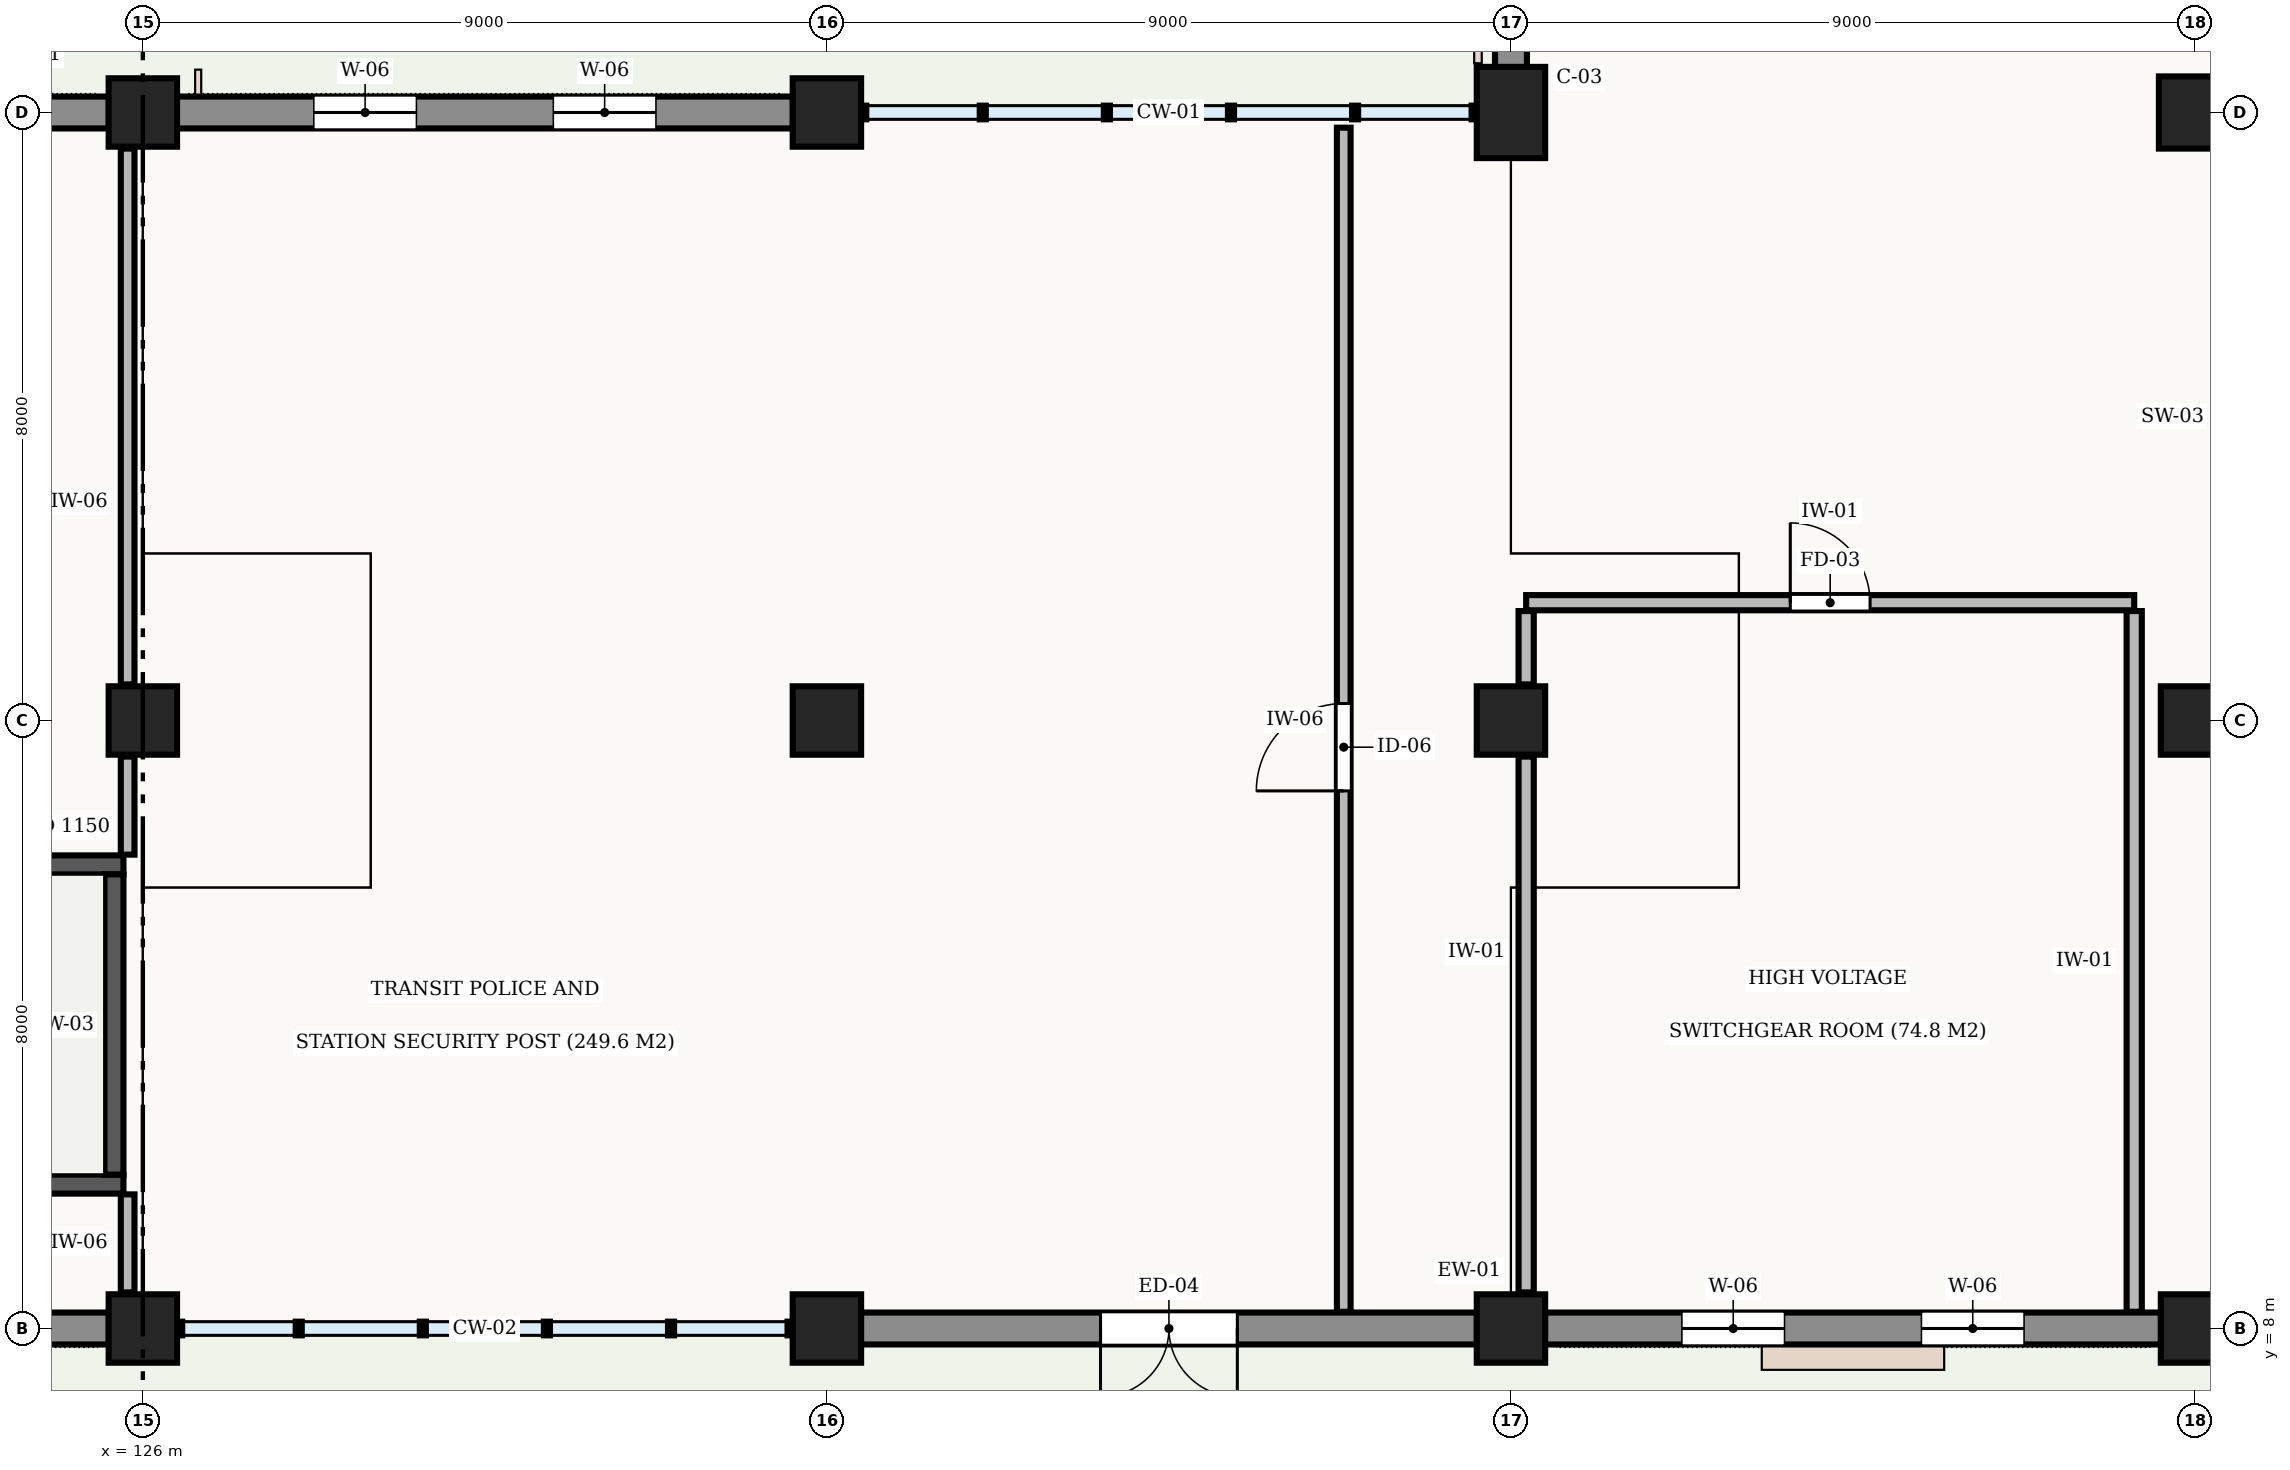
"""IFC4 building model, lengths in metres.
Left out: names, types, materials, properties, quantities, classifications, styles, units other than length and angle.
Written with IfcOpenShell. Run it as: python <this file> out.ifc"""

import sys

from ifc_helpers import new_model, si_unit, direction, frame, frame_2d, origin, origin_2d, place, context, subcontext, project, spatial, rectangle, extrude, element, fill, save


model = new_model("IFC4")
c1 = context("Model", 3, precision=1e-05, world=origin(), true_north=direction((0.0, 1.0)))
c2 = subcontext(c1, "Body", "Model", "MODEL_VIEW")
j1 = project(units=[si_unit("LENGTHUNIT", "METRE"), si_unit("PLANEANGLEUNIT", "RADIAN")], contexts=[c1])
p1 = place(None, origin())
s1 = spatial("IfcSite", under=j1, at=p1, CompositionType="ELEMENT")
p2 = place(p1, origin())
s2 = spatial("IfcBuilding", under=s1, at=p2, CompositionType="ELEMENT")
p3 = place(p2, origin())
s3 = spatial("IfcBuildingStorey", under=s2, at=p3, CompositionType="ELEMENT", Elevation=0.0)
for number, where, z_axis, x_axis in (
    (1, (126.0, 8.0, -0.42), (0.0, 0.0, 1.0), (1.0, 0.0, 0.0)),
    (2, (126.0, 16.0, -0.42), (0.0, 0.0, 1.0), (1.0, 0.0, 0.0)),
    (3, (126.0, 24.0, -0.42), (0.0, 0.0, 1.0), (1.0, 0.0, 0.0)),
    (4, (135.0, 8.0, -0.42), (0.0, 0.0, 1.0), (1.0, 0.0, 0.0)),
    (5, (135.0, 16.0, -0.42), (0.0, 0.0, 1.0), (1.0, 0.0, 0.0)),
    (6, (135.0, 24.0, -0.42), (0.0, 0.0, 1.0), (1.0, 0.0, 0.0)),
    (7, (144.0, 8.0, -0.42), (0.0, 0.0, 1.0), (1.0, 0.0, 0.0)),
    (8, (144.0, 16.0, -0.42), (0.0, 0.0, 1.0), (1.0, 0.0, 0.0)),
):
    element("IfcColumn", number, at=place(p3, frame(where, z_axis=z_axis, x_axis=x_axis)), inside=s3, PredefinedType="COLUMN", context=c2, shape_type="SweptSolid", body=[
        extrude(rectangle(XDim=0.9, YDim=0.9, at=origin_2d()), origin(), (0.0, 0.0, 1.0), 5.82),
    ])
p4 = place(p3, frame((144.0, 24.0, -0.42), z_axis=(0.0, 0.0, 1.0), x_axis=(1.0, 0.0, 0.0)))
e9 = element("IfcColumn", 9, at=p4, inside=s3, PredefinedType="COLUMN", context=c2, shape_type="SweptSolid", body=[
    extrude(rectangle(XDim=0.9, YDim=1.2, at=origin_2d()), origin(), (0.0, 0.0, 1.0), 5.82),
])
for number, where, z_axis, x_axis in (
    (10, (153.0, 8.0, -0.42), (0.0, 0.0, 1.0), (1.0, 0.0, 0.0)),
    (11, (153.0, 16.0, -0.42), (0.0, 0.0, 1.0), (1.0, 0.0, 0.0)),
):
    element("IfcColumn", number, at=place(p3, frame(where, z_axis=z_axis, x_axis=x_axis)), inside=s3, PredefinedType="COLUMN", context=c2, shape_type="SweptSolid", body=[
        extrude(rectangle(XDim=0.9, YDim=0.9, at=origin_2d()), origin(), (0.0, 0.0, 1.0), 5.82),
    ])
p5 = place(p3, frame((153.0, 24.0, -0.42), z_axis=(0.0, 0.0, 1.0), x_axis=(1.0, 0.0, 0.0)))
e12 = element("IfcColumn", 12, at=p5, inside=s3, PredefinedType="COLUMN", context=c2, shape_type="SweptSolid", body=[
    extrude(rectangle(XDim=0.95, YDim=0.95, at=origin_2d()), origin(), (0.0, 0.0, 1.0), 5.82),
])
p6 = place(p3, frame((152.552, 8.0, 0.0), z_axis=(0.0, 0.0, 1.0), x_axis=(-1.0, 0.0, 0.0)))
e13 = element("IfcWall", 13, at=p6, inside=s3, PredefinedType="STANDARD", context=c2, shape_type="SweptSolid", body=[
    extrude(rectangle(XDim=8.104, YDim=0.42, at=frame_2d((4.052, 0.0))), origin(), (0.0, 0.0, 1.0), 4.38),
])
p7 = place(p6, frame((1.801, 0.0, 0.9)))
e14 = element("IfcOpeningElement", 14, at=p7, cuts=e13, PredefinedType="OPENING", context=c2, shape_type="SweptSolid", body=[
    extrude(rectangle(XDim=1.35, YDim=2.0, at=frame_2d((0.675, 1.0))), frame((0.0, 0.222, 0.0), z_axis=(0.0, -1.0, 0.0), x_axis=(1.0, 0.0, 0.0)), (0.0, 0.0, 1.0), 0.444),
])
p8 = place(p6, frame((4.953, 0.0, 0.9)))
e15 = element("IfcOpeningElement", 15, at=p8, cuts=e13, PredefinedType="OPENING", context=c2, shape_type="SweptSolid", body=[
    extrude(rectangle(XDim=1.35, YDim=2.0, at=frame_2d((0.675, 1.0))), frame((0.0, 0.222, 0.0), z_axis=(0.0, -1.0, 0.0), x_axis=(1.0, 0.0, 0.0)), (0.0, 0.0, 1.0), 0.444),
])
p9 = place(p3, frame((143.552, 8.0, 0.0), z_axis=(0.0, 0.0, 1.0), x_axis=(-1.0, 0.0, 0.0)))
e16 = element("IfcWall", 16, at=p9, inside=s3, PredefinedType="STANDARD", context=c2, shape_type="SweptSolid", body=[
    extrude(rectangle(XDim=8.104, YDim=0.42, at=frame_2d((4.052, 0.0))), origin(), (0.0, 0.0, 1.0), 4.38),
])
p10 = place(p9, frame((3.152, 0.0, 0.0)))
e17 = element("IfcOpeningElement", 17, at=p10, cuts=e16, PredefinedType="OPENING", context=c2, shape_type="SweptSolid", body=[
    extrude(rectangle(XDim=1.8, YDim=2.4, at=frame_2d((0.9, 1.2))), frame((0.0, 0.222, 0.0), z_axis=(0.0, -1.0, 0.0), x_axis=(1.0, 0.0, 0.0)), (0.0, 0.0, 1.0), 0.444),
])
p11 = place(p3, frame((125.552, 8.0, 0.0), z_axis=(0.0, 0.0, 1.0), x_axis=(-1.0, 0.0, 0.0)))
e18 = element("IfcWall", 18, at=p11, inside=s3, PredefinedType="STANDARD", context=c2, shape_type="SweptSolid", body=[
    extrude(rectangle(XDim=8.104, YDim=0.42, at=frame_2d((4.052, 0.0))), origin(), (0.0, 0.0, 1.0), 4.38),
])
p12 = place(p11, frame((1.501, 0.0, 0.9)))
e19 = element("IfcOpeningElement", 19, at=p12, cuts=e18, PredefinedType="OPENING", context=c2, shape_type="SweptSolid", body=[
    extrude(rectangle(XDim=1.8, YDim=2.4, at=frame_2d((0.9, 1.2))), frame((0.0, 0.222, 0.0), z_axis=(0.0, -1.0, 0.0), x_axis=(1.0, 0.0, 0.0)), (0.0, 0.0, 1.0), 0.444),
])
p13 = place(p11, frame((4.803, 0.0, 0.9)))
e20 = element("IfcOpeningElement", 20, at=p13, cuts=e18, PredefinedType="OPENING", context=c2, shape_type="SweptSolid", body=[
    extrude(rectangle(XDim=1.8, YDim=2.4, at=frame_2d((0.9, 1.2))), frame((0.0, 0.222, 0.0), z_axis=(0.0, -1.0, 0.0), x_axis=(1.0, 0.0, 0.0)), (0.0, 0.0, 1.0), 0.444),
])
p14 = place(p3, frame((126.448, 24.0, 0.0), z_axis=(0.0, 0.0, 1.0), x_axis=(1.0, 0.0, 0.0)))
e21 = element("IfcWall", 21, at=p14, inside=s3, PredefinedType="STANDARD", context=c2, shape_type="SweptSolid", body=[
    extrude(rectangle(XDim=8.104, YDim=0.42, at=frame_2d((4.052, 0.0))), origin(), (0.0, 0.0, 1.0), 4.38),
])
p15 = place(p14, frame((1.801, 0.0, 0.9)))
e22 = element("IfcOpeningElement", 22, at=p15, cuts=e21, PredefinedType="OPENING", context=c2, shape_type="SweptSolid", body=[
    extrude(rectangle(XDim=1.35, YDim=2.0, at=frame_2d((0.675, 1.0))), frame((0.0, 0.222, 0.0), z_axis=(0.0, -1.0, 0.0), x_axis=(1.0, 0.0, 0.0)), (0.0, 0.0, 1.0), 0.444),
])
p16 = place(p14, frame((4.953, 0.0, 0.9)))
e23 = element("IfcOpeningElement", 23, at=p16, cuts=e21, PredefinedType="OPENING", context=c2, shape_type="SweptSolid", body=[
    extrude(rectangle(XDim=1.35, YDim=2.0, at=frame_2d((0.675, 1.0))), frame((0.0, 0.222, 0.0), z_axis=(0.0, -1.0, 0.0), x_axis=(1.0, 0.0, 0.0)), (0.0, 0.0, 1.0), 0.444),
])
p17 = place(p3, frame((144.0, 24.598, 0.0), z_axis=(0.0, 0.0, 1.0), x_axis=(0.0, 1.0, 0.0)))
e24 = element("IfcWall", 24, at=p17, inside=s3, PredefinedType="STANDARD", context=c2, shape_type="SweptSolid", body=[
    extrude(rectangle(XDim=6.804, YDim=0.42, at=frame_2d((3.402, 0.0))), origin(), (0.0, 0.0, 1.0), 4.38),
])
p18 = place(p17, frame((1.368, 0.0, 0.9)))
e25 = element("IfcOpeningElement", 25, at=p18, cuts=e24, PredefinedType="OPENING", context=c2, shape_type="SweptSolid", body=[
    extrude(rectangle(XDim=1.35, YDim=2.0, at=frame_2d((0.675, 1.0))), frame((0.0, 0.222, 0.0), z_axis=(0.0, -1.0, 0.0), x_axis=(1.0, 0.0, 0.0)), (0.0, 0.0, 1.0), 0.444),
])
p19 = place(p17, frame((4.086, 0.0, 0.9)))
e26 = element("IfcOpeningElement", 26, at=p19, cuts=e24, PredefinedType="OPENING", context=c2, shape_type="SweptSolid", body=[
    extrude(rectangle(XDim=1.35, YDim=2.0, at=frame_2d((0.675, 1.0))), frame((0.0, 0.222, 0.0), z_axis=(0.0, -1.0, 0.0), x_axis=(1.0, 0.0, 0.0)), (0.0, 0.0, 1.0), 0.444),
])
p20 = place(p3, frame((117.448, 24.0, 0.0), z_axis=(0.0, 0.0, 1.0), x_axis=(1.0, 0.0, 0.0)))
e27 = element("IfcWall", 27, at=p20, inside=s3, PredefinedType="STANDARD", context=c2, shape_type="SweptSolid", body=[
    extrude(rectangle(XDim=8.104, YDim=0.42, at=frame_2d((4.052, 0.0))), origin(), (0.0, 0.0, 1.0), 4.38),
])
p21 = place(p20, frame((1.501, 0.0, 0.9)))
e28 = element("IfcOpeningElement", 28, at=p21, cuts=e27, PredefinedType="OPENING", context=c2, shape_type="SweptSolid", body=[
    extrude(rectangle(XDim=1.8, YDim=2.4, at=frame_2d((0.9, 1.2))), frame((0.0, 0.222, 0.0), z_axis=(0.0, -1.0, 0.0), x_axis=(1.0, 0.0, 0.0)), (0.0, 0.0, 1.0), 0.444),
])
p22 = place(p20, frame((4.803, 0.0, 0.9)))
e29 = element("IfcOpeningElement", 29, at=p22, cuts=e27, PredefinedType="OPENING", context=c2, shape_type="SweptSolid", body=[
    extrude(rectangle(XDim=1.8, YDim=2.4, at=frame_2d((0.9, 1.2))), frame((0.0, 0.222, 0.0), z_axis=(0.0, -1.0, 0.0), x_axis=(1.0, 0.0, 0.0)), (0.0, 0.0, 1.0), 0.444),
])
p23 = place(p3, frame((117.255, 9.9, 0.0), z_axis=(0.0, 0.0, 1.0), x_axis=(1.0, 0.0, 0.0)))
e30 = element("IfcWall", 30, at=p23, inside=s3, PredefinedType="SHEAR", context=c2, shape_type="SweptSolid", body=[
    extrude(rectangle(XDim=8.49, YDim=0.25, at=frame_2d((4.245, 0.0))), origin(), (0.0, 0.0, 1.0), 5.05),
])
p24 = place(p3, frame((125.745, 14.1, 0.0), z_axis=(0.0, 0.0, 1.0), x_axis=(-1.0, 0.0, 0.0)))
e31 = element("IfcWall", 31, at=p24, inside=s3, PredefinedType="SHEAR", context=c2, shape_type="SweptSolid", body=[
    extrude(rectangle(XDim=8.49, YDim=0.25, at=frame_2d((4.245, 0.0))), origin(), (0.0, 0.0, 1.0), 5.05),
])
p25 = place(p24, frame((6.835, 0.0, 0.0)))
e32 = element("IfcOpeningElement", 32, at=p25, cuts=e31, PredefinedType="OPENING", context=c2, shape_type="SweptSolid", body=[
    extrude(rectangle(XDim=1.25, YDim=2.15, at=frame_2d((0.625, 1.075))), frame((0.0, 0.137, 0.0), z_axis=(0.0, -1.0, 0.0), x_axis=(1.0, 0.0, 0.0)), (0.0, 0.0, 1.0), 0.274),
])
p26 = place(p3, frame((125.62, 10.025, 0.0), z_axis=(0.0, 0.0, 1.0), x_axis=(0.0, 1.0, 0.0)))
e33 = element("IfcWall", 33, at=p26, inside=s3, PredefinedType="SHEAR", context=c2, shape_type="SweptSolid", body=[
    extrude(rectangle(XDim=3.95, YDim=0.25, at=frame_2d((1.975, 0.0))), origin(), (0.0, 0.0, 1.0), 5.05),
])
for number, where, z_axis, x_axis in (
    (34, (125.8, 8.475, 0.0), (0.0, 0.0, 1.0), (0.0, 1.0, 0.0)),
    (35, (125.8, 14.235, 0.0), (0.0, 0.0, 1.0), (0.0, 1.0, 0.0)),
):
    element("IfcWall", number, at=place(p3, frame(where, z_axis=z_axis, x_axis=x_axis)), inside=s3, PredefinedType="STANDARD", context=c2, shape_type="SweptSolid", body=[
        extrude(rectangle(XDim=1.29, YDim=0.18, at=frame_2d((0.645, 0.0))), origin(), (0.0, 0.0, 1.0), 4.33),
    ])
p27 = place(p3, frame((125.8, 16.475, 0.0), z_axis=(0.0, 0.0, 1.0), x_axis=(0.0, 1.0, 0.0)))
e36 = element("IfcWall", 36, at=p27, inside=s3, PredefinedType="STANDARD", context=c2, shape_type="SweptSolid", body=[
    extrude(rectangle(XDim=7.05, YDim=0.18, at=frame_2d((3.525, 0.0))), origin(), (0.0, 0.0, 1.0), 4.33),
])
p28 = place(p3, frame((141.8, 8.22, 0.0), z_axis=(0.0, 0.0, 1.0), x_axis=(0.0, 1.0, 0.0)))
e37 = element("IfcWall", 37, at=p28, inside=s3, PredefinedType="STANDARD", context=c2, shape_type="SweptSolid", body=[
    extrude(rectangle(XDim=15.58, YDim=0.18, at=frame_2d((7.79, 0.0))), origin(), (0.0, 0.0, 1.0), 5.05),
])
p29 = place(p28, frame((6.854, 0.0, 0.0)))
e38 = element("IfcOpeningElement", 38, at=p29, cuts=e37, PredefinedType="OPENING", context=c2, shape_type="SweptSolid", body=[
    extrude(rectangle(XDim=1.15, YDim=2.15, at=frame_2d((0.575, 1.075))), frame((0.0, 0.102, 0.0), z_axis=(0.0, -1.0, 0.0), x_axis=(1.0, 0.0, 0.0)), (0.0, 0.0, 1.0), 0.204),
])
p30 = place(p3, frame((144.2, 17.55, 0.0), z_axis=(0.0, 0.0, 1.0), x_axis=(1.0, 0.0, 0.0)))
e39 = element("IfcWall", 39, at=p30, inside=s3, PredefinedType="STANDARD", context=c2, shape_type="SweptSolid", body=[
    extrude(rectangle(XDim=8.0, YDim=0.2, at=frame_2d((4.0, 0.0))), origin(), (0.0, 0.0, 1.0), 5.05),
])
p31 = place(p30, frame((3.475, 0.0, 0.0)))
e40 = element("IfcOpeningElement", 40, at=p31, cuts=e39, PredefinedType="OPENING", context=c2, shape_type="SweptSolid", body=[
    extrude(rectangle(XDim=1.05, YDim=2.15, at=frame_2d((0.525, 1.075))), frame((0.0, 0.112, 0.0), z_axis=(0.0, -1.0, 0.0), x_axis=(1.0, 0.0, 0.0)), (0.0, 0.0, 1.0), 0.224),
])
p32 = place(p3, frame((144.2, 8.475, 0.0), z_axis=(0.0, 0.0, 1.0), x_axis=(0.0, 1.0, 0.0)))
e41 = element("IfcWall", 41, at=p32, inside=s3, PredefinedType="STANDARD", context=c2, shape_type="SweptSolid", body=[
    extrude(rectangle(XDim=7.05, YDim=0.2, at=frame_2d((3.525, 0.0))), origin(), (0.0, 0.0, 1.0), 4.33),
])
p33 = place(p3, frame((144.2, 16.475, 0.0), z_axis=(0.0, 0.0, 1.0), x_axis=(0.0, 1.0, 0.0)))
e42 = element("IfcWall", 42, at=p33, inside=s3, PredefinedType="STANDARD", context=c2, shape_type="SweptSolid", body=[
    extrude(rectangle(XDim=0.965, YDim=0.2, at=frame_2d((0.482, 0.0))), origin(), (0.0, 0.0, 1.0), 4.33),
])
p34 = place(p3, frame((152.2, 8.22, 0.0), z_axis=(0.0, 0.0, 1.0), x_axis=(0.0, 1.0, 0.0)))
e43 = element("IfcWall", 43, at=p34, inside=s3, PredefinedType="STANDARD", context=c2, shape_type="SweptSolid", body=[
    extrude(rectangle(XDim=9.22, YDim=0.2, at=frame_2d((4.61, 0.0))), origin(), (0.0, 0.0, 1.0), 5.05),
])
p35 = place(p7, origin())
e44 = element("IfcWindow", 44, at=p35, inside=s3, PartitioningType="SINGLE_PANEL", PredefinedType="WINDOW", context=c2, shape_type="SweptSolid", body=[
    extrude(rectangle(XDim=1.35, YDim=2.0, at=frame_2d((0.675, 1.0))), frame((0.0, 0.03, 0.0), z_axis=(0.0, -1.0, 0.0), x_axis=(1.0, 0.0, 0.0)), (0.0, 0.0, 1.0), 0.06),
])
fill(e14, e44)
p36 = place(p8, origin())
e45 = element("IfcWindow", 45, at=p36, inside=s3, PartitioningType="SINGLE_PANEL", PredefinedType="WINDOW", context=c2, shape_type="SweptSolid", body=[
    extrude(rectangle(XDim=1.35, YDim=2.0, at=frame_2d((0.675, 1.0))), frame((0.0, 0.03, 0.0), z_axis=(0.0, -1.0, 0.0), x_axis=(1.0, 0.0, 0.0)), (0.0, 0.0, 1.0), 0.06),
])
fill(e15, e45)
p37 = place(p10, origin())
e46 = element("IfcDoor", 46, at=p37, inside=s3, OperationType="SINGLE_SWING_LEFT", PredefinedType="DOOR", context=c2, shape_type="SweptSolid", body=[
    extrude(rectangle(XDim=1.8, YDim=2.4, at=frame_2d((0.9, 1.2))), frame((0.0, 0.025, 0.0), z_axis=(0.0, -1.0, 0.0), x_axis=(1.0, 0.0, 0.0)), (0.0, 0.0, 1.0), 0.05),
])
fill(e17, e46)
p38 = place(p15, origin())
e47 = element("IfcWindow", 47, at=p38, inside=s3, PartitioningType="SINGLE_PANEL", PredefinedType="WINDOW", context=c2, shape_type="SweptSolid", body=[
    extrude(rectangle(XDim=1.35, YDim=2.0, at=frame_2d((0.675, 1.0))), frame((0.0, 0.03, 0.0), z_axis=(0.0, -1.0, 0.0), x_axis=(1.0, 0.0, 0.0)), (0.0, 0.0, 1.0), 0.06),
])
fill(e22, e47)
p39 = place(p16, origin())
e48 = element("IfcWindow", 48, at=p39, inside=s3, PartitioningType="SINGLE_PANEL", PredefinedType="WINDOW", context=c2, shape_type="SweptSolid", body=[
    extrude(rectangle(XDim=1.35, YDim=2.0, at=frame_2d((0.675, 1.0))), frame((0.0, 0.03, 0.0), z_axis=(0.0, -1.0, 0.0), x_axis=(1.0, 0.0, 0.0)), (0.0, 0.0, 1.0), 0.06),
])
fill(e23, e48)
p40 = place(p29, origin())
e49 = element("IfcDoor", 49, at=p40, inside=s3, OperationType="SINGLE_SWING_LEFT", PredefinedType="DOOR", context=c2, shape_type="SweptSolid", body=[
    extrude(rectangle(XDim=1.15, YDim=2.15, at=frame_2d((0.575, 1.075))), frame((0.0, 0.025, 0.0), z_axis=(0.0, -1.0, 0.0), x_axis=(1.0, 0.0, 0.0)), (0.0, 0.0, 1.0), 0.05),
])
fill(e38, e49)
p41 = place(p31, origin())
e50 = element("IfcDoor", 50, at=p41, inside=s3, OperationType="SINGLE_SWING_LEFT", PredefinedType="DOOR", context=c2, shape_type="SweptSolid", body=[
    extrude(rectangle(XDim=1.05, YDim=2.15, at=frame_2d((0.525, 1.075))), frame((0.0, 0.025, 0.0), z_axis=(0.0, -1.0, 0.0), x_axis=(1.0, 0.0, 0.0)), (0.0, 0.0, 1.0), 0.05),
])
fill(e40, e50)
save(model, sys.argv[1])
